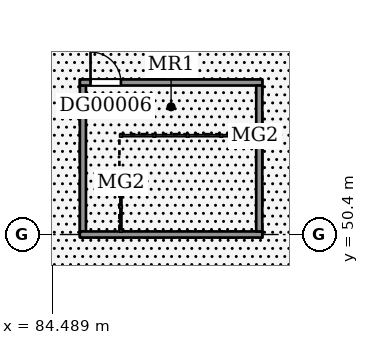
"""IFC4 building model, lengths in metres.
Left out: names, types, materials, properties, quantities, classifications, styles, units other than length and angle.
Written with IfcOpenShell. Run it as: python <this file> out.ifc"""

import sys

from ifc_helpers import new_model, si_unit, direction, frame, frame_2d, origin, place, context, subcontext, project, spatial, rectangle, extrude, element, fill, save


model = new_model("IFC4")
c1 = context("Model", 3, precision=1e-05, world=origin(), true_north=direction((0.0, 1.0)))
c2 = subcontext(c1, "Body", "Model", "MODEL_VIEW")
j1 = project(units=[si_unit("LENGTHUNIT", "METRE"), si_unit("PLANEANGLEUNIT", "RADIAN")], contexts=[c1])
p1 = place(None, origin())
s1 = spatial("IfcSite", under=j1, at=p1, CompositionType="ELEMENT")
p2 = place(p1, origin())
s2 = spatial("IfcBuilding", under=s1, at=p2, CompositionType="ELEMENT")
p3 = place(p2, origin())
s3 = spatial("IfcBuildingStorey", under=s2, at=p3, CompositionType="ELEMENT", Elevation=0.0)
p4 = place(p3, frame((85.5, 50.5, 0.0), z_axis=(0.0, 0.0, 1.0), x_axis=(0.0, 1.0, 0.0)))
e1 = element("IfcWall", 1, at=p4, inside=s3, PredefinedType="SOLIDWALL", context=c2, shape_type="SweptSolid", body=[
    extrude(rectangle(XDim=4.8, YDim=0.2, at=frame_2d((2.4, 0.0))), origin(), (0.0, 0.0, 1.0), 3.6),
])
p5 = place(p3, frame((85.4, 50.4, 0.0), z_axis=(0.0, 0.0, 1.0), x_axis=(1.0, 0.0, 0.0)))
e2 = element("IfcWall", 2, at=p5, inside=s3, PredefinedType="SOLIDWALL", context=c2, shape_type="SweptSolid", body=[
    extrude(rectangle(XDim=6.0, YDim=0.2, at=frame_2d((3.0, 0.0))), origin(), (0.0, 0.0, 1.0), 3.6),
])
p6 = place(p3, frame((85.4, 55.4, 0.0), z_axis=(0.0, 0.0, 1.0), x_axis=(1.0, 0.0, 0.0)))
e3 = element("IfcWall", 3, at=p6, inside=s3, PredefinedType="SOLIDWALL", context=c2, shape_type="SweptSolid", body=[
    extrude(rectangle(XDim=6.0, YDim=0.2, at=frame_2d((3.0, 0.0))), origin(), (0.0, 0.0, 1.0), 3.6),
])
p7 = place(p6, frame((0.35, 0.0, 0.0)))
e4 = element("IfcOpeningElement", 4, at=p7, cuts=e3, PredefinedType="OPENING", context=c2, shape_type="SweptSolid", body=[
    extrude(rectangle(XDim=1.0, YDim=2.1, at=frame_2d((0.5, 1.05))), frame((0.0, 0.11, 0.0), z_axis=(0.0, -1.0, 0.0), x_axis=(1.0, 0.0, 0.0)), (0.0, 0.0, 1.0), 0.22),
])
p8 = place(p3, frame((91.3, 50.5, 0.0), z_axis=(0.0, 0.0, 1.0), x_axis=(0.0, 1.0, 0.0)))
e5 = element("IfcWall", 5, at=p8, inside=s3, PredefinedType="SOLIDWALL", context=c2, shape_type="SweptSolid", body=[
    extrude(rectangle(XDim=4.8, YDim=0.2, at=frame_2d((2.4, 0.0))), origin(), (0.0, 0.0, 1.0), 3.6),
])
p9 = place(p7, origin())
e6 = element("IfcDoor", 6, at=p9, inside=s3, OperationType="SINGLE_SWING_LEFT", PredefinedType="DOOR", context=c2, shape_type="SweptSolid", body=[
    extrude(rectangle(XDim=1.0, YDim=2.1, at=frame_2d((0.5, 1.05))), frame((0.0, 0.025, 0.0), z_axis=(0.0, -1.0, 0.0), x_axis=(1.0, 0.0, 0.0)), (0.0, 0.0, 1.0), 0.05),
])
fill(e4, e6)
save(model, sys.argv[1])
